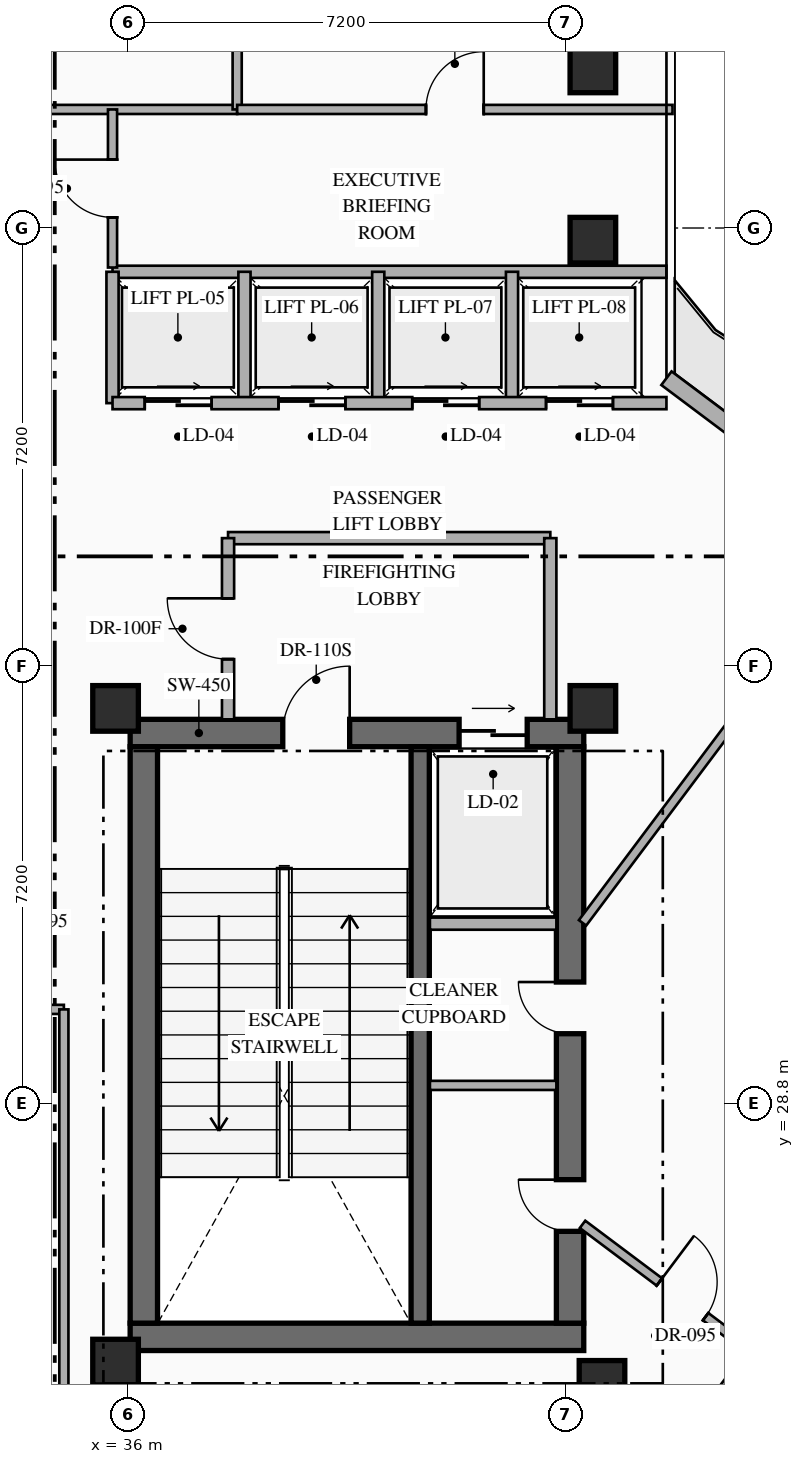
"""IFC4 building model, lengths in metres.
Left out: names, types, materials, properties, quantities, classifications, styles, units other than length and angle.
Written with IfcOpenShell. Run it as: python <this file> out.ifc"""

import sys

from ifc_helpers import new_model, si_unit, direction, frame, frame_2d, origin, origin_2d, place, context, subcontext, project, spatial, rectangle, hollow_rectangle, extrude, element, fill, save


model = new_model("IFC4")
c1 = context("Model", 3, precision=1e-05, world=origin(), true_north=direction((0.0, 1.0)))
c2 = subcontext(c1, "Body", "Model", "MODEL_VIEW")
j1 = project(units=[si_unit("LENGTHUNIT", "METRE"), si_unit("PLANEANGLEUNIT", "RADIAN")], contexts=[c1])
p1 = place(None, origin())
s1 = spatial("IfcSite", under=j1, at=p1, CompositionType="ELEMENT")
p2 = place(p1, origin())
s2 = spatial("IfcBuilding", under=s1, at=p2, CompositionType="ELEMENT")
p3 = place(p2, frame((0.0, 0.0, 186.75)))
s3 = spatial("IfcBuildingStorey", under=s2, at=p3, CompositionType="ELEMENT", Elevation=186.75)
p4 = place(p3, frame((36.04, 24.965, 0.0), z_axis=(0.0, 0.0, 1.0), x_axis=(1.0, 0.0, 0.0)))
e1 = element("IfcWall", 1, at=p4, inside=s3, PredefinedType="SHEAR", context=c2, shape_type="SweptSolid", body=[
    extrude(rectangle(XDim=7.46, YDim=0.45, at=frame_2d((3.73, 0.0))), origin(), (0.0, 0.0, 1.0), 4.8),
])
p5 = place(p3, frame((36.04, 34.895, 0.0), z_axis=(0.0, 0.0, 1.0), x_axis=(1.0, 0.0, 0.0)))
e2 = element("IfcWall", 2, at=p5, inside=s3, PredefinedType="SHEAR", context=c2, shape_type="SweptSolid", body=[
    extrude(rectangle(XDim=7.46, YDim=0.45, at=frame_2d((3.73, 0.0))), origin(), (0.0, 0.0, 1.0), 4.8),
])
p6 = place(p5, frame((2.51, 0.0, 0.0)))
e3 = element("IfcOpeningElement", 3, at=p6, cuts=e2, PredefinedType="OPENING", context=c2, shape_type="SweptSolid", body=[
    extrude(rectangle(XDim=1.1, YDim=2.2, at=frame_2d((0.55, 1.1))), frame((0.0, 0.235, 0.0), z_axis=(0.0, -1.0, 0.0), x_axis=(1.0, 0.0, 0.0)), (0.0, 0.0, 1.0), 0.47),
])
p7 = place(p5, frame((5.41, 0.0, 0.0)))
e4 = element("IfcOpeningElement", 4, at=p7, cuts=e2, PredefinedType="OPENING", context=c2, shape_type="SweptSolid", body=[
    extrude(rectangle(XDim=1.12, YDim=2.15, at=frame_2d((0.56, 1.075))), frame((0.0, 0.235, 0.0), z_axis=(0.0, -1.0, 0.0), x_axis=(1.0, 0.0, 0.0)), (0.0, 0.0, 1.0), 0.47),
])
p8 = place(p3, frame((36.265, 25.19, 0.0), z_axis=(0.0, 0.0, 1.0), x_axis=(0.0, 1.0, 0.0)))
e5 = element("IfcWall", 5, at=p8, inside=s3, PredefinedType="SHEAR", context=c2, shape_type="SweptSolid", body=[
    extrude(rectangle(XDim=9.48, YDim=0.45, at=frame_2d((4.74, 0.0))), origin(), (0.0, 0.0, 1.0), 4.8),
])
p9 = place(p3, frame((43.275, 25.19, 0.0), z_axis=(0.0, 0.0, 1.0), x_axis=(0.0, 1.0, 0.0)))
e6 = element("IfcWall", 6, at=p9, inside=s3, PredefinedType="SHEAR", context=c2, shape_type="SweptSolid", body=[
    extrude(rectangle(XDim=9.48, YDim=0.45, at=frame_2d((4.74, 0.0))), origin(), (0.0, 0.0, 1.0), 4.8),
])
p10 = place(p9, frame((1.51, 0.0, 0.0)))
e7 = element("IfcOpeningElement", 7, at=p10, cuts=e6, PredefinedType="OPENING", context=c2, shape_type="SweptSolid", body=[
    extrude(rectangle(XDim=0.85, YDim=2.08, at=frame_2d((0.425, 1.04))), frame((0.0, 0.235, 0.0), z_axis=(0.0, -1.0, 0.0), x_axis=(1.0, 0.0, 0.0)), (0.0, 0.0, 1.0), 0.47),
])
p11 = place(p9, frame((4.76, 0.0, 0.0)))
e8 = element("IfcOpeningElement", 8, at=p11, cuts=e6, PredefinedType="OPENING", context=c2, shape_type="SweptSolid", body=[
    extrude(rectangle(XDim=0.85, YDim=2.08, at=frame_2d((0.425, 1.04))), frame((0.0, 0.235, 0.0), z_axis=(0.0, -1.0, 0.0), x_axis=(1.0, 0.0, 0.0)), (0.0, 0.0, 1.0), 0.47),
])
p12 = place(p3, frame((40.81, 25.19, 0.0), z_axis=(0.0, 0.0, 1.0), x_axis=(0.0, 1.0, 0.0)))
e9 = element("IfcWall", 9, at=p12, inside=s3, PredefinedType="SHEAR", context=c2, shape_type="SweptSolid", body=[
    extrude(rectangle(XDim=9.48, YDim=0.3, at=frame_2d((4.74, 0.0))), origin(), (0.0, 0.0, 1.0), 4.8),
])
for number, where, z_axis, x_axis in (
    (10, (35.8, 24.55, 0.0), (0.0, 0.0, 1.0), (1.0, 0.0, 0.0)),
    (11, (43.8, 24.2, 0.0), (0.0, 0.0, 1.0), (1.0, 0.0, 0.0)),
    (12, (35.8, 35.3, 0.0), (0.0, 0.0, 1.0), (1.0, 0.0, 0.0)),
    (13, (43.65, 35.3, 0.0), (0.0, 0.0, 1.0), (1.0, 0.0, 0.0)),
    (14, (43.65, 43.0, 0.0), (0.0, 0.0, 1.0), (1.0, 0.0, 0.0)),
    (15, (43.65, 45.8, 0.0), (0.0, 0.0, 1.0), (1.0, 0.0, 0.0)),
):
    element("IfcColumn", number, at=place(p3, frame(where, z_axis=z_axis, x_axis=x_axis)), inside=s3, PredefinedType="COLUMN", context=c2, shape_type="SweptSolid", body=[
        extrude(hollow_rectangle(XDim=0.75, YDim=0.75, WallThickness=0.028, at=origin_2d()), origin(), (0.0, 0.0, 1.0), 4.8),
    ])
p13 = place(p3, frame((44.86, 40.73, 0.0), z_axis=(0.0, 0.0, 1.0), x_axis=(0.800007624502, -0.599989833863, 0.0)))
e16 = element("IfcWall", 16, at=p13, inside=s3, PredefinedType="STANDARD", context=c2, shape_type="SweptSolid", body=[
    extrude(rectangle(XDim=19.212, YDim=0.28, at=frame_2d((9.606, 0.0))), origin(), (0.0, 0.0, 1.0), 4.55),
])
p14 = place(p13, frame((1.755, 0.0, 0.0)))
e17 = element("IfcOpeningElement", 17, at=p14, cuts=e16, PredefinedType="OPENING", context=c2, shape_type="SweptSolid", body=[
    extrude(rectangle(XDim=1.1, YDim=2.2, at=frame_2d((0.55, 1.1))), frame((0.0, 0.15, 0.0), z_axis=(0.0, -1.0, 0.0), x_axis=(1.0, 0.0, 0.0)), (0.0, 0.0, 1.0), 0.3),
])
p15 = place(p13, frame((13.509, 0.0, 0.85)))
e18 = element("IfcOpeningElement", 18, at=p15, cuts=e16, PredefinedType="OPENING", context=c2, shape_type="SweptSolid", body=[
    extrude(rectangle(XDim=1.8, YDim=2.1, at=frame_2d((0.9, 1.05))), frame((0.0, 0.15, 0.0), z_axis=(0.0, -1.0, 0.0), x_axis=(1.0, 0.0, 0.0)), (0.0, 0.0, 1.0), 0.3),
])
p16 = place(p3, frame((40.97, 31.76, 0.0), z_axis=(0.0, 0.0, 1.0), x_axis=(1.0, 0.0, 0.0)))
e19 = element("IfcWall", 19, at=p16, inside=s3, PredefinedType="STANDARD", context=c2, shape_type="SweptSolid", body=[
    extrude(rectangle(XDim=2.08, YDim=0.2, at=frame_2d((1.04, 0.0))), origin(), (0.0, 0.0, 1.0), 4.55),
])
p17 = place(p3, frame((40.97, 29.1, 0.0), z_axis=(0.0, 0.0, 1.0), x_axis=(1.0, 0.0, 0.0)))
e20 = element("IfcWall", 20, at=p17, inside=s3, PredefinedType="PARTITIONING", context=c2, shape_type="SweptSolid", body=[
    extrude(rectangle(XDim=2.08, YDim=0.15, at=frame_2d((1.04, 0.0))), origin(), (0.0, 0.0, 1.0), 4.55),
])
p18 = place(p3, frame((37.65, 38.1, 0.0), z_axis=(0.0, 0.0, 1.0), x_axis=(1.0, 0.0, 0.0)))
e21 = element("IfcWall", 21, at=p18, inside=s3, PredefinedType="STANDARD", context=c2, shape_type="SweptSolid", body=[
    extrude(rectangle(XDim=5.3, YDim=0.2, at=frame_2d((2.65, 0.0))), origin(), (0.0, 0.0, 1.0), 4.55),
])
p19 = place(p3, frame((42.95, 35.12, 0.0), z_axis=(0.0, 0.0, 1.0), x_axis=(0.0, 1.0, 0.0)))
e22 = element("IfcWall", 22, at=p19, inside=s3, PredefinedType="STANDARD", context=c2, shape_type="SweptSolid", body=[
    extrude(rectangle(XDim=2.98, YDim=0.2, at=frame_2d((1.49, 0.0))), origin(), (0.0, 0.0, 1.0), 4.55),
])
p20 = place(p3, frame((37.65, 35.12, 0.0), z_axis=(0.0, 0.0, 1.0), x_axis=(0.0, 1.0, 0.0)))
e23 = element("IfcWall", 23, at=p20, inside=s3, PredefinedType="STANDARD", context=c2, shape_type="SweptSolid", body=[
    extrude(rectangle(XDim=2.98, YDim=0.2, at=frame_2d((1.49, 0.0))), origin(), (0.0, 0.0, 1.0), 4.55),
])
p21 = place(p20, frame((0.99, 0.0, 0.0)))
e24 = element("IfcOpeningElement", 24, at=p21, cuts=e23, PredefinedType="OPENING", context=c2, shape_type="SweptSolid", body=[
    extrude(rectangle(XDim=1.0, YDim=2.2, at=frame_2d((0.5, 1.1))), frame((0.0, 0.11, 0.0), z_axis=(0.0, -1.0, 0.0), x_axis=(1.0, 0.0, 0.0)), (0.0, 0.0, 1.0), 0.22),
])
p22 = place(p3, frame((35.75, 42.48, 0.0), z_axis=(0.0, 0.0, 1.0), x_axis=(1.0, 0.0, 0.0)))
e25 = element("IfcWall", 25, at=p22, inside=s3, PredefinedType="STANDARD", context=c2, shape_type="SweptSolid", body=[
    extrude(rectangle(XDim=9.11, YDim=0.2, at=frame_2d((4.555, 0.0))), origin(), (0.0, 0.0, 1.0), 4.55),
])
for number, where, z_axis, x_axis in (
    (26, (35.75, 40.32, 0.0), (0.0, 0.0, 1.0), (0.0, 1.0, 0.0)),
    (27, (37.92, 40.32, 0.0), (0.0, 0.0, 1.0), (0.0, 1.0, 0.0)),
    (28, (40.12, 40.32, 0.0), (0.0, 0.0, 1.0), (0.0, 1.0, 0.0)),
    (29, (42.32, 40.32, 0.0), (0.0, 0.0, 1.0), (0.0, 1.0, 0.0)),
):
    element("IfcWall", number, at=place(p3, frame(where, z_axis=z_axis, x_axis=x_axis)), inside=s3, PredefinedType="STANDARD", context=c2, shape_type="SweptSolid", body=[
        extrude(rectangle(XDim=2.16, YDim=0.2, at=frame_2d((1.08, 0.0))), origin(), (0.0, 0.0, 1.0), 4.55),
    ])
p23 = place(p3, frame((35.75, 40.32, 0.0), z_axis=(0.0, 0.0, 1.0), x_axis=(1.0, 0.0, 0.0)))
e30 = element("IfcWall", 30, at=p23, inside=s3, PredefinedType="STANDARD", context=c2, shape_type="SweptSolid", body=[
    extrude(rectangle(XDim=9.11, YDim=0.2, at=frame_2d((4.555, 0.0))), origin(), (0.0, 0.0, 1.0), 4.55),
])
p24 = place(p23, frame((0.53, 0.0, 0.0)))
e31 = element("IfcOpeningElement", 31, at=p24, cuts=e30, PredefinedType="OPENING", context=c2, shape_type="SweptSolid", body=[
    extrude(rectangle(XDim=1.1, YDim=2.18, at=frame_2d((0.55, 1.09))), frame((0.0, 0.11, 0.0), z_axis=(0.0, -1.0, 0.0), x_axis=(1.0, 0.0, 0.0)), (0.0, 0.0, 1.0), 0.22),
])
p25 = place(p23, frame((2.73, 0.0, 0.0)))
e32 = element("IfcOpeningElement", 32, at=p25, cuts=e30, PredefinedType="OPENING", context=c2, shape_type="SweptSolid", body=[
    extrude(rectangle(XDim=1.1, YDim=2.18, at=frame_2d((0.55, 1.09))), frame((0.0, 0.11, 0.0), z_axis=(0.0, -1.0, 0.0), x_axis=(1.0, 0.0, 0.0)), (0.0, 0.0, 1.0), 0.22),
])
p26 = place(p23, frame((4.93, 0.0, 0.0)))
e33 = element("IfcOpeningElement", 33, at=p26, cuts=e30, PredefinedType="OPENING", context=c2, shape_type="SweptSolid", body=[
    extrude(rectangle(XDim=1.1, YDim=2.18, at=frame_2d((0.55, 1.09))), frame((0.0, 0.11, 0.0), z_axis=(0.0, -1.0, 0.0), x_axis=(1.0, 0.0, 0.0)), (0.0, 0.0, 1.0), 0.22),
])
p27 = place(p23, frame((7.13, 0.0, 0.0)))
e34 = element("IfcOpeningElement", 34, at=p27, cuts=e30, PredefinedType="OPENING", context=c2, shape_type="SweptSolid", body=[
    extrude(rectangle(XDim=1.1, YDim=2.18, at=frame_2d((0.55, 1.09))), frame((0.0, 0.11, 0.0), z_axis=(0.0, -1.0, 0.0), x_axis=(1.0, 0.0, 0.0)), (0.0, 0.0, 1.0), 0.22),
])
p28 = place(p3, frame((30.5, 30.35, 0.0), z_axis=(0.0, 0.0, 1.0), x_axis=(1.0, 0.0, 0.0)))
e35 = element("IfcWall", 35, at=p28, inside=s3, PredefinedType="PARTITIONING", context=c2, shape_type="SweptSolid", body=[
    extrude(rectangle(XDim=4.45, YDim=0.15, at=frame_2d((2.225, 0.0))), origin(), (0.0, 0.0, 1.0), 4.55),
])
p29 = place(p28, frame((2.846, 0.0, 0.0)))
e36 = element("IfcOpeningElement", 36, at=p29, cuts=e35, PredefinedType="OPENING", context=c2, shape_type="SweptSolid", body=[
    extrude(rectangle(XDim=0.95, YDim=2.15, at=frame_2d((0.475, 1.075))), frame((0.0, 0.085, 0.0), z_axis=(0.0, -1.0, 0.0), x_axis=(1.0, 0.0, 0.0)), (0.0, 0.0, 1.0), 0.17),
])
p30 = place(p3, frame((34.95, 23.2, 0.0), z_axis=(0.0, 0.0, 1.0), x_axis=(0.0, 1.0, 0.0)))
e37 = element("IfcWall", 37, at=p30, inside=s3, PredefinedType="PARTITIONING", context=c2, shape_type="SweptSolid", body=[
    extrude(rectangle(XDim=7.15, YDim=0.15, at=frame_2d((3.575, 0.0))), origin(), (0.0, 0.0, 1.0), 4.55),
])
p31 = place(p3, frame((29.8, 45.15, 0.0), z_axis=(0.0, 0.0, 1.0), x_axis=(1.0, 0.0, 0.0)))
e38 = element("IfcWall", 38, at=p31, inside=s3, PredefinedType="PARTITIONING", context=c2, shape_type="SweptSolid", body=[
    extrude(rectangle(XDim=8.0, YDim=0.15, at=frame_2d((4.0, 0.0))), origin(), (0.0, 0.0, 1.0), 4.55),
])
p32 = place(p31, frame((0.694, 0.0, 0.0)))
e39 = element("IfcOpeningElement", 39, at=p32, cuts=e38, PredefinedType="OPENING", context=c2, shape_type="SweptSolid", body=[
    extrude(rectangle(XDim=0.95, YDim=2.15, at=frame_2d((0.475, 1.075))), frame((0.0, 0.085, 0.0), z_axis=(0.0, -1.0, 0.0), x_axis=(1.0, 0.0, 0.0)), (0.0, 0.0, 1.0), 0.17),
])
p33 = place(p3, frame((37.8, 45.15, 0.0), z_axis=(0.0, 0.0, 1.0), x_axis=(0.0, 1.0, 0.0)))
e40 = element("IfcWall", 40, at=p33, inside=s3, PredefinedType="PARTITIONING", context=c2, shape_type="SweptSolid", body=[
    extrude(rectangle(XDim=5.21, YDim=0.15, at=frame_2d((2.605, 0.0))), origin(), (0.0, 0.0, 1.0), 4.55),
])
p34 = place(p3, frame((37.8, 45.15, 0.0), z_axis=(0.0, 0.0, 1.0), x_axis=(1.0, 0.0, 0.0)))
e41 = element("IfcWall", 41, at=p34, inside=s3, PredefinedType="PARTITIONING", context=c2, shape_type="SweptSolid", body=[
    extrude(rectangle(XDim=7.16, YDim=0.15, at=frame_2d((3.58, 0.0))), origin(), (0.0, 0.0, 1.0), 4.55),
])
p35 = place(p34, frame((3.105, 0.0, 0.0)))
e42 = element("IfcOpeningElement", 42, at=p35, cuts=e41, PredefinedType="OPENING", context=c2, shape_type="SweptSolid", body=[
    extrude(rectangle(XDim=0.95, YDim=2.15, at=frame_2d((0.475, 1.075))), frame((0.0, 0.085, 0.0), z_axis=(0.0, -1.0, 0.0), x_axis=(1.0, 0.0, 0.0)), (0.0, 0.0, 1.0), 0.17),
])
p36 = place(p3, frame((41.43, 18.29, 0.0), z_axis=(0.0, 0.0, 1.0), x_axis=(0.599995730889, 0.800003201816, 0.0)))
e43 = element("IfcWall", 43, at=p36, inside=s3, PredefinedType="PARTITIONING", context=c2, shape_type="SweptSolid", body=[
    extrude(rectangle(XDim=9.15, YDim=0.15, at=frame_2d((4.575, 0.0))), origin(), (0.0, 0.0, 1.0), 4.55),
])
p37 = place(p36, frame((4.1, 0.0, 0.0)))
e44 = element("IfcOpeningElement", 44, at=p37, cuts=e43, PredefinedType="OPENING", context=c2, shape_type="SweptSolid", body=[
    extrude(rectangle(XDim=0.95, YDim=2.15, at=frame_2d((0.475, 1.075))), frame((0.0, 0.085, 0.0), z_axis=(0.0, -1.0, 0.0), x_axis=(1.0, 0.0, 0.0)), (0.0, 0.0, 1.0), 0.17),
])
p38 = place(p3, frame((43.48, 26.815, 0.0), z_axis=(0.0, 0.0, 1.0), x_axis=(0.800008430676, -0.599988758934, 0.0)))
e45 = element("IfcWall", 45, at=p38, inside=s3, PredefinedType="PARTITIONING", context=c2, shape_type="SweptSolid", body=[
    extrude(rectangle(XDim=3.475, YDim=0.15, at=frame_2d((1.738, 0.0))), origin(), (0.0, 0.0, 1.0), 4.55),
])
p39 = place(p38, frame((1.58, 0.0, 0.0)))
e46 = element("IfcOpeningElement", 46, at=p39, cuts=e45, PredefinedType="OPENING", context=c2, shape_type="SweptSolid", body=[
    extrude(rectangle(XDim=0.95, YDim=2.15, at=frame_2d((0.475, 1.075))), frame((0.0, 0.085, 0.0), z_axis=(0.0, -1.0, 0.0), x_axis=(1.0, 0.0, 0.0)), (0.0, 0.0, 1.0), 0.17),
])
p40 = place(p3, frame((43.48, 31.773, 0.0), z_axis=(0.0, 0.0, 1.0), x_axis=(0.599971041729, 0.800021717885, 0.0)))
e47 = element("IfcWall", 47, at=p40, inside=s3, PredefinedType="PARTITIONING", context=c2, shape_type="SweptSolid", body=[
    extrude(rectangle(XDim=8.094, YDim=0.15, at=frame_2d((4.047, 0.0))), origin(), (0.0, 0.0, 1.0), 4.55),
])
p41 = place(p3, frame((35.75, 42.55, 0.0), z_axis=(0.0, 0.0, 1.0), x_axis=(0.0, 1.0, 0.0)))
e48 = element("IfcWall", 48, at=p41, inside=s3, PredefinedType="PARTITIONING", context=c2, shape_type="SweptSolid", body=[
    extrude(rectangle(XDim=2.6, YDim=0.15, at=frame_2d((1.3, 0.0))), origin(), (0.0, 0.0, 1.0), 4.55),
])
p42 = place(p41, frame((0.825, 0.0, 0.0)))
e49 = element("IfcOpeningElement", 49, at=p42, cuts=e48, PredefinedType="OPENING", context=c2, shape_type="SweptSolid", body=[
    extrude(rectangle(XDim=0.95, YDim=2.15, at=frame_2d((0.475, 1.075))), frame((0.0, 0.085, 0.0), z_axis=(0.0, -1.0, 0.0), x_axis=(1.0, 0.0, 0.0)), (0.0, 0.0, 1.0), 0.17),
])
p43 = place(p3, frame((27.91, 26.68, 0.0), z_axis=(0.0, 0.0, 1.0), x_axis=(0.800005938517, -0.599992081896, 0.0)))
e50 = element("IfcWall", 50, at=p43, inside=s3, PredefinedType="PARTITIONING", context=c2, shape_type="SweptSolid", body=[
    extrude(rectangle(XDim=14.8, YDim=0.15, at=frame_2d((7.4, 0.0))), origin(), (0.0, 0.0, 1.0), 4.55),
])
p44 = place(p43, frame((9.281, 0.0, 0.0)))
e51 = element("IfcOpeningElement", 51, at=p44, cuts=e50, PredefinedType="OPENING", context=c2, shape_type="SweptSolid", body=[
    extrude(rectangle(XDim=0.95, YDim=2.15, at=frame_2d((0.475, 1.075))), frame((0.0, 0.085, 0.0), z_axis=(0.0, -1.0, 0.0), x_axis=(1.0, 0.0, 0.0)), (0.0, 0.0, 1.0), 0.17),
])
p45 = place(p6, origin())
e52 = element("IfcDoor", 52, at=p45, inside=s3, OperationType="SINGLE_SWING_RIGHT", PredefinedType="DOOR", context=c2, shape_type="SweptSolid", body=[
    extrude(rectangle(XDim=1.1, YDim=2.2, at=frame_2d((0.55, 1.1))), frame((0.0, 0.025, 0.0), z_axis=(0.0, -1.0, 0.0), x_axis=(1.0, 0.0, 0.0)), (0.0, 0.0, 1.0), 0.05),
])
fill(e3, e52)
p46 = place(p7, origin())
e53 = element("IfcDoor", 53, at=p46, inside=s3, OperationType="SLIDING_TO_RIGHT", PredefinedType="USERDEFINED", context=c2, shape_type="SweptSolid", body=[
    extrude(rectangle(XDim=1.12, YDim=2.15, at=frame_2d((0.56, 1.075))), frame((0.0, 0.025, 0.0), z_axis=(0.0, -1.0, 0.0), x_axis=(1.0, 0.0, 0.0)), (0.0, 0.0, 1.0), 0.05),
])
fill(e4, e53)
p47 = place(p10, origin())
e54 = element("IfcDoor", 54, at=p47, inside=s3, OperationType="SINGLE_SWING_RIGHT", PredefinedType="DOOR", context=c2, shape_type="SweptSolid", body=[
    extrude(rectangle(XDim=0.85, YDim=2.08, at=frame_2d((0.425, 1.04))), frame((0.0, 0.025, 0.0), z_axis=(0.0, -1.0, 0.0), x_axis=(1.0, 0.0, 0.0)), (0.0, 0.0, 1.0), 0.05),
])
fill(e7, e54)
p48 = place(p11, origin())
e55 = element("IfcDoor", 55, at=p48, inside=s3, OperationType="SINGLE_SWING_RIGHT", PredefinedType="DOOR", context=c2, shape_type="SweptSolid", body=[
    extrude(rectangle(XDim=0.85, YDim=2.08, at=frame_2d((0.425, 1.04))), frame((0.0, 0.025, 0.0), z_axis=(0.0, -1.0, 0.0), x_axis=(1.0, 0.0, 0.0)), (0.0, 0.0, 1.0), 0.05),
])
fill(e8, e55)
p49 = place(p21, origin())
e56 = element("IfcDoor", 56, at=p49, inside=s3, OperationType="SINGLE_SWING_RIGHT", PredefinedType="DOOR", context=c2, shape_type="SweptSolid", body=[
    extrude(rectangle(XDim=1.0, YDim=2.2, at=frame_2d((0.5, 1.1))), frame((0.0, 0.025, 0.0), z_axis=(0.0, -1.0, 0.0), x_axis=(1.0, 0.0, 0.0)), (0.0, 0.0, 1.0), 0.05),
])
fill(e24, e56)
p50 = place(p24, origin())
e57 = element("IfcDoor", 57, at=p50, inside=s3, OperationType="SLIDING_TO_RIGHT", PredefinedType="USERDEFINED", context=c2, shape_type="SweptSolid", body=[
    extrude(rectangle(XDim=1.1, YDim=2.18, at=frame_2d((0.55, 1.09))), frame((0.0, 0.025, 0.0), z_axis=(0.0, -1.0, 0.0), x_axis=(1.0, 0.0, 0.0)), (0.0, 0.0, 1.0), 0.05),
])
fill(e31, e57)
p51 = place(p25, origin())
e58 = element("IfcDoor", 58, at=p51, inside=s3, OperationType="SLIDING_TO_RIGHT", PredefinedType="USERDEFINED", context=c2, shape_type="SweptSolid", body=[
    extrude(rectangle(XDim=1.1, YDim=2.18, at=frame_2d((0.55, 1.09))), frame((0.0, 0.025, 0.0), z_axis=(0.0, -1.0, 0.0), x_axis=(1.0, 0.0, 0.0)), (0.0, 0.0, 1.0), 0.05),
])
fill(e32, e58)
p52 = place(p26, origin())
e59 = element("IfcDoor", 59, at=p52, inside=s3, OperationType="SLIDING_TO_RIGHT", PredefinedType="USERDEFINED", context=c2, shape_type="SweptSolid", body=[
    extrude(rectangle(XDim=1.1, YDim=2.18, at=frame_2d((0.55, 1.09))), frame((0.0, 0.025, 0.0), z_axis=(0.0, -1.0, 0.0), x_axis=(1.0, 0.0, 0.0)), (0.0, 0.0, 1.0), 0.05),
])
fill(e33, e59)
p53 = place(p27, origin())
e60 = element("IfcDoor", 60, at=p53, inside=s3, OperationType="SLIDING_TO_RIGHT", PredefinedType="USERDEFINED", context=c2, shape_type="SweptSolid", body=[
    extrude(rectangle(XDim=1.1, YDim=2.18, at=frame_2d((0.55, 1.09))), frame((0.0, 0.025, 0.0), z_axis=(0.0, -1.0, 0.0), x_axis=(1.0, 0.0, 0.0)), (0.0, 0.0, 1.0), 0.05),
])
fill(e34, e60)
p54 = place(p35, origin())
e61 = element("IfcDoor", 61, at=p54, inside=s3, OperationType="SINGLE_SWING_RIGHT", PredefinedType="DOOR", context=c2, shape_type="SweptSolid", body=[
    extrude(rectangle(XDim=0.95, YDim=2.15, at=frame_2d((0.475, 1.075))), frame((0.0, 0.025, 0.0), z_axis=(0.0, -1.0, 0.0), x_axis=(1.0, 0.0, 0.0)), (0.0, 0.0, 1.0), 0.05),
])
fill(e42, e61)
p55 = place(p39, origin())
e62 = element("IfcDoor", 62, at=p55, inside=s3, OperationType="SINGLE_SWING_LEFT", PredefinedType="DOOR", context=c2, shape_type="SweptSolid", body=[
    extrude(rectangle(XDim=0.95, YDim=2.15, at=frame_2d((0.475, 1.075))), frame((0.0, 0.025, 0.0), z_axis=(0.0, -1.0, 0.0), x_axis=(1.0, 0.0, 0.0)), (0.0, 0.0, 1.0), 0.05),
])
fill(e46, e62)
p56 = place(p42, origin())
e63 = element("IfcDoor", 63, at=p56, inside=s3, OperationType="SINGLE_SWING_RIGHT", PredefinedType="DOOR", context=c2, shape_type="SweptSolid", body=[
    extrude(rectangle(XDim=0.95, YDim=2.15, at=frame_2d((0.475, 1.075))), frame((0.0, 0.025, 0.0), z_axis=(0.0, -1.0, 0.0), x_axis=(1.0, 0.0, 0.0)), (0.0, 0.0, 1.0), 0.05),
])
fill(e49, e63)
save(model, sys.argv[1])
